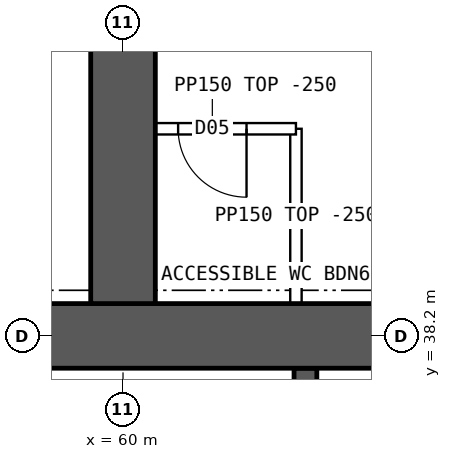
"""IFC4 building model, lengths in metres.
Left out: names, types, materials, properties, quantities, classifications, styles, units other than length and angle.
Written with IfcOpenShell. Run it as: python <this file> out.ifc"""

import sys

from ifc_helpers import new_model, si_unit, direction, frame, frame_2d, origin, place, context, subcontext, project, spatial, rectangle, extrude, element, fill, save


model = new_model("IFC4")
c1 = context("Model", 3, precision=1e-05, world=origin(), true_north=direction((0.0, 1.0)))
c2 = subcontext(c1, "Body", "Model", "MODEL_VIEW")
j1 = project(units=[si_unit("LENGTHUNIT", "METRE"), si_unit("PLANEANGLEUNIT", "RADIAN")], contexts=[c1])
p1 = place(None, origin())
s1 = spatial("IfcSite", under=j1, at=p1, CompositionType="ELEMENT")
p2 = place(p1, origin())
s2 = spatial("IfcBuilding", under=s1, at=p2, CompositionType="ELEMENT")
p3 = place(p2, frame((0.0, 0.0, 171.1)))
s3 = spatial("IfcBuildingStorey", under=s2, at=p3, CompositionType="ELEMENT", Elevation=171.1)
p4 = place(p3, frame((18.0, 38.2, 0.0), z_axis=(0.0, 0.0, 1.0), x_axis=(1.0, 0.0, 0.0)))
e1 = element("IfcWall", 1, at=p4, inside=s3, PredefinedType="SHEAR", context=c2, shape_type="SweptSolid", body=[
    extrude(rectangle(XDim=48.0, YDim=0.85, at=frame_2d((24.0, 0.0))), origin(), (0.0, 0.0, 1.0), 3.75),
])
p5 = place(p3, frame((62.4, 34.75, 0.0), z_axis=(0.0, 0.0, 1.0), x_axis=(0.0, 1.0, 0.0)))
e2 = element("IfcWall", 2, at=p5, inside=s3, PredefinedType="SHEAR", context=c2, shape_type="SweptSolid", body=[
    extrude(rectangle(XDim=3.025, YDim=0.3, at=frame_2d((1.512, 0.0))), origin(), (0.0, 0.0, 1.0), 3.75),
])
p6 = place(p3, frame((60.0, 38.625, 0.0), z_axis=(0.0, 0.0, 1.0), x_axis=(0.0, 1.0, 0.0)))
e3 = element("IfcWall", 3, at=p6, inside=s3, PredefinedType="SHEAR", context=c2, shape_type="SweptSolid", body=[
    extrude(rectangle(XDim=8.175, YDim=0.85, at=frame_2d((4.087, 0.0))), origin(), (0.0, 0.0, 1.0), 3.75),
])
p7 = place(p3, frame((62.275, 40.925, 0.0), z_axis=(0.0, 0.0, 1.0), x_axis=(0.0, -1.0, 0.0)))
e4 = element("IfcWall", 4, at=p7, inside=s3, PredefinedType="PARTITIONING", context=c2, shape_type="SweptSolid", body=[
    extrude(rectangle(XDim=2.3, YDim=0.15, at=frame_2d((1.15, 0.0))), origin(), (0.0, 0.0, 1.0), 3.5),
])
p8 = place(p3, frame((62.275, 40.925, 0.0), z_axis=(0.0, 0.0, 1.0), x_axis=(-1.0, 0.0, 0.0)))
e5 = element("IfcWall", 5, at=p8, inside=s3, PredefinedType="PARTITIONING", context=c2, shape_type="SweptSolid", body=[
    extrude(rectangle(XDim=2.2, YDim=0.15, at=frame_2d((1.1, 0.0))), origin(), (0.0, 0.0, 1.0), 3.5),
])
p9 = place(p8, frame((0.65, 0.0, 0.0)))
e6 = element("IfcOpeningElement", 6, at=p9, cuts=e5, PredefinedType="OPENING", context=c2, shape_type="SweptSolid", body=[
    extrude(rectangle(XDim=0.9, YDim=2.1, at=frame_2d((0.45, 1.05))), frame((0.0, 0.085, 0.0), z_axis=(0.0, -1.0, 0.0), x_axis=(1.0, 0.0, 0.0)), (0.0, 0.0, 1.0), 0.17),
])
p10 = place(p9, origin())
e7 = element("IfcDoor", 7, at=p10, inside=s3, OperationType="SINGLE_SWING_LEFT", PredefinedType="DOOR", context=c2, shape_type="SweptSolid", body=[
    extrude(rectangle(XDim=0.9, YDim=2.1, at=frame_2d((0.45, 1.05))), frame((0.0, 0.025, 0.0), z_axis=(0.0, -1.0, 0.0), x_axis=(1.0, 0.0, 0.0)), (0.0, 0.0, 1.0), 0.05),
])
fill(e6, e7)
save(model, sys.argv[1])
